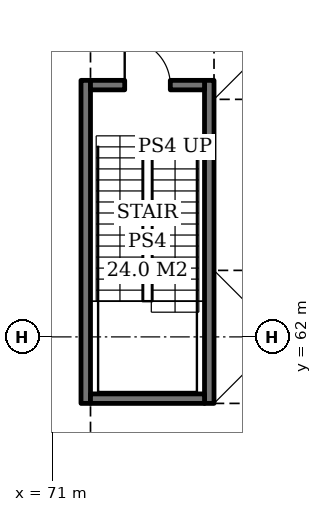
"""IFC4 building model, lengths in metres.
Left out: names, types, materials, properties, quantities, classifications, styles, units other than length and angle.
Written with IfcOpenShell. Run it as: python <this file> out.ifc"""

import sys

from ifc_helpers import new_model, si_unit, direction, frame, frame_2d, origin, place, context, subcontext, project, spatial, rectangle, extrude, element, fill, save


model = new_model("IFC4")
c1 = context("Model", 3, precision=1e-05, world=origin(), true_north=direction((0.0, 1.0)))
c2 = subcontext(c1, "Body", "Model", "MODEL_VIEW")
j1 = project(units=[si_unit("LENGTHUNIT", "METRE"), si_unit("PLANEANGLEUNIT", "RADIAN")], contexts=[c1])
p1 = place(None, origin())
s1 = spatial("IfcSite", under=j1, at=p1, CompositionType="ELEMENT")
p2 = place(p1, origin())
s2 = spatial("IfcBuilding", under=s1, at=p2, CompositionType="ELEMENT")
p3 = place(p2, frame((0.0, 0.0, -10.0)))
s3 = spatial("IfcBuildingStorey", under=s2, at=p3, CompositionType="ELEMENT", Elevation=-10.0)
for number, where, z_axis, x_axis in (
    (1, (71.875, 60.25, 0.0), (0.0, 0.0, 1.0), (0.0, 1.0, 0.0)),
    (2, (75.125, 60.25, 0.0), (0.0, 0.0, 1.0), (0.0, 1.0, 0.0)),
):
    element("IfcWall", number, at=place(p3, frame(where, z_axis=z_axis, x_axis=x_axis)), inside=s3, PredefinedType="SOLIDWALL", context=c2, shape_type="SweptSolid", body=[
        extrude(rectangle(XDim=8.5, YDim=0.25, at=frame_2d((4.25, 0.0))), origin(), (0.0, 0.0, 1.0), 4.7),
    ])
p4 = place(p3, frame((72.0, 60.375, 0.0), z_axis=(0.0, 0.0, 1.0), x_axis=(1.0, 0.0, 0.0)))
e3 = element("IfcWall", 3, at=p4, inside=s3, PredefinedType="SOLIDWALL", context=c2, shape_type="SweptSolid", body=[
    extrude(rectangle(XDim=3.0, YDim=0.25, at=frame_2d((1.5, 0.0))), origin(), (0.0, 0.0, 1.0), 4.7),
])
p5 = place(p3, frame((72.0, 68.625, 0.0), z_axis=(0.0, 0.0, 1.0), x_axis=(1.0, 0.0, 0.0)))
e4 = element("IfcWall", 4, at=p5, inside=s3, PredefinedType="SOLIDWALL", context=c2, shape_type="SweptSolid", body=[
    extrude(rectangle(XDim=3.0, YDim=0.25, at=frame_2d((1.5, 0.0))), origin(), (0.0, 0.0, 1.0), 4.7),
])
p6 = place(p5, frame((0.9, 0.0, 0.0)))
e5 = element("IfcOpeningElement", 5, at=p6, cuts=e4, PredefinedType="OPENING", context=c2, shape_type="SweptSolid", body=[
    extrude(rectangle(XDim=1.2, YDim=2.1, at=frame_2d((0.6, 1.05))), frame((0.0, 0.135, 0.0), z_axis=(0.0, -1.0, 0.0), x_axis=(1.0, 0.0, 0.0)), (0.0, 0.0, 1.0), 0.27),
])
p7 = place(p6, origin())
e6 = element("IfcDoor", 6, at=p7, inside=s3, OperationType="SINGLE_SWING_LEFT", PredefinedType="DOOR", context=c2, shape_type="SweptSolid", body=[
    extrude(rectangle(XDim=1.2, YDim=2.1, at=frame_2d((0.6, 1.05))), frame((0.0, 0.025, 0.0), z_axis=(0.0, -1.0, 0.0), x_axis=(1.0, 0.0, 0.0)), (0.0, 0.0, 1.0), 0.05),
])
fill(e5, e6)
save(model, sys.argv[1])
